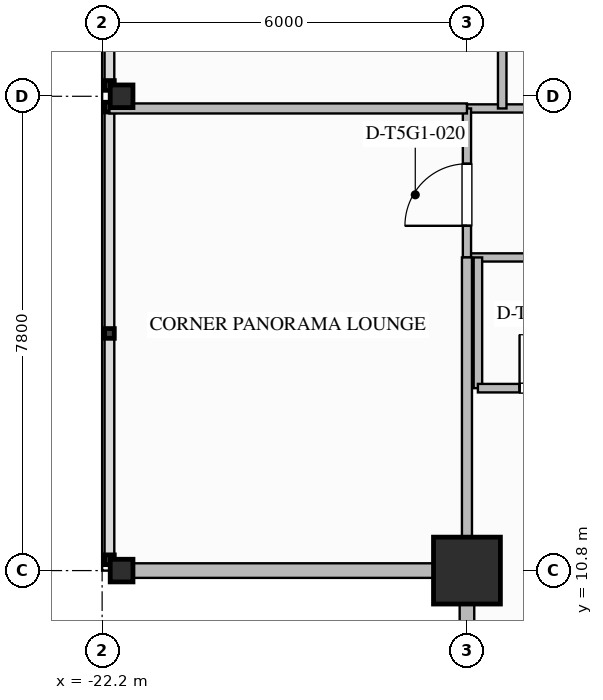
"""IFC4 building model, lengths in metres.
Left out: names, types, materials, properties, quantities, classifications, styles, units other than length and angle.
Written with IfcOpenShell. Run it as: python <this file> out.ifc"""

import sys

from ifc_helpers import new_model, si_unit, direction, frame, frame_2d, origin, origin_2d, place, context, subcontext, project, spatial, rectangle, i_section, extrude, element, fill, save


model = new_model("IFC4")
c1 = context("Model", 3, precision=1e-05, world=origin(), true_north=direction((0.0, 1.0)))
c2 = subcontext(c1, "Body", "Model", "MODEL_VIEW")
j1 = project(units=[si_unit("LENGTHUNIT", "METRE"), si_unit("PLANEANGLEUNIT", "RADIAN")], contexts=[c1])
p1 = place(None, origin())
s1 = spatial("IfcSite", under=j1, at=p1, CompositionType="ELEMENT")
p2 = place(p1, origin())
s2 = spatial("IfcBuilding", under=s1, at=p2, CompositionType="ELEMENT")
p3 = place(p2, frame((0.0, 0.0, 265.0)))
s3 = spatial("IfcBuildingStorey", under=s2, at=p3, CompositionType="ELEMENT", Elevation=265.0)
p4 = place(p3, frame((-16.2, 10.8, 0.0), z_axis=(0.0, 0.0, 1.0), x_axis=(1.0, 0.0, 0.0)))
e1 = element("IfcColumn", 1, at=p4, inside=s3, PredefinedType="COLUMN", context=c2, shape_type="SweptSolid", body=[
    extrude(rectangle(XDim=1.1, YDim=1.1, at=origin_2d()), origin(), (0.0, 0.0, 1.0), 3.65),
])
for number, where, z_axis, x_axis in (
    (2, (-21.88, 10.8, 0.0), (0.0, 0.0, 1.0), (1.0, 0.0, 0.0)),
    (3, (-21.88, 18.6, 0.0), (0.0, 0.0, 1.0), (1.0, 0.0, 0.0)),
):
    element("IfcColumn", number, at=place(p3, frame(where, z_axis=z_axis, x_axis=x_axis)), inside=s3, PredefinedType="COLUMN", context=c2, shape_type="SweptSolid", body=[
        extrude(i_section(OverallWidth=0.374, OverallDepth=0.372, WebThickness=0.016, FlangeThickness=0.026, FilletRadius=0.025, at=origin_2d()), origin(), (0.0, 0.0, 1.0), 3.647),
    ])
for number, where, z_axis, x_axis in (
    (4, (-16.2, 4.92, 0.0), (0.0, 0.0, 1.0), (0.0, 1.0, 0.0)),
    (5, (-16.2, 10.8, 0.0), (0.0, 0.0, 1.0), (-1.0, 0.0, 0.0)),
):
    element("IfcWall", number, at=place(p3, frame(where, z_axis=z_axis, x_axis=x_axis)), inside=s3, PredefinedType="STANDARD", context=c2, shape_type="SweptSolid", body=[
        extrude(rectangle(XDim=5.88, YDim=0.24, at=frame_2d((2.94, 0.0))), origin(), (0.0, 0.0, 1.0), 2.779),
    ])
p5 = place(p3, frame((-16.2, 15.95, 0.0), z_axis=(0.0, 0.0, 1.0), x_axis=(1.0, 0.0, 0.0)))
e6 = element("IfcWall", 6, at=p5, inside=s3, PredefinedType="PARTITIONING", context=c2, shape_type="SweptSolid", body=[
    extrude(rectangle(XDim=38.28, YDim=0.135, at=frame_2d((19.14, 0.0))), origin(), (0.0, 0.0, 1.0), 3.39),
])
p6 = place(p5, frame((35.785, 0.0, 0.0)))
e7 = element("IfcOpeningElement", 7, at=p6, cuts=e6, PredefinedType="OPENING", context=c2, shape_type="SweptSolid", body=[
    extrude(rectangle(XDim=1.26, YDim=2.2, at=frame_2d((0.63, 1.1))), frame((0.0, 0.077, 0.0), z_axis=(0.0, -1.0, 0.0), x_axis=(1.0, 0.0, 0.0)), (0.0, 0.0, 1.0), 0.155),
])
p7 = place(p5, frame((3.285, 0.0, 0.0)))
e8 = element("IfcOpeningElement", 8, at=p7, cuts=e6, PredefinedType="OPENING", context=c2, shape_type="SweptSolid", body=[
    extrude(rectangle(XDim=1.26, YDim=2.2, at=frame_2d((0.63, 1.1))), frame((0.0, 0.077, 0.0), z_axis=(0.0, -1.0, 0.0), x_axis=(1.0, 0.0, 0.0)), (0.0, 0.0, 1.0), 0.155),
])
p8 = place(p5, frame((7.335, 0.0, 0.0)))
e9 = element("IfcOpeningElement", 9, at=p8, cuts=e6, PredefinedType="OPENING", context=c2, shape_type="SweptSolid", body=[
    extrude(rectangle(XDim=1.26, YDim=2.2, at=frame_2d((0.63, 1.1))), frame((0.0, 0.077, 0.0), z_axis=(0.0, -1.0, 0.0), x_axis=(1.0, 0.0, 0.0)), (0.0, 0.0, 1.0), 0.155),
])
p9 = place(p5, frame((15.69, 0.0, 0.0)))
e10 = element("IfcOpeningElement", 10, at=p9, cuts=e6, PredefinedType="OPENING", context=c2, shape_type="SweptSolid", body=[
    extrude(rectangle(XDim=1.02, YDim=2.15, at=frame_2d((0.51, 1.075))), frame((0.0, 0.077, 0.0), z_axis=(0.0, -1.0, 0.0), x_axis=(1.0, 0.0, 0.0)), (0.0, 0.0, 1.0), 0.155),
])
p10 = place(p5, frame((21.375, 0.0, 0.0)))
e11 = element("IfcOpeningElement", 11, at=p10, cuts=e6, PredefinedType="OPENING", context=c2, shape_type="SweptSolid", body=[
    extrude(rectangle(XDim=1.26, YDim=2.2, at=frame_2d((0.63, 1.1))), frame((0.0, 0.077, 0.0), z_axis=(0.0, -1.0, 0.0), x_axis=(1.0, 0.0, 0.0)), (0.0, 0.0, 1.0), 0.155),
])
p11 = place(p5, frame((30.285, 0.0, 0.0)))
e12 = element("IfcOpeningElement", 12, at=p11, cuts=e6, PredefinedType="OPENING", context=c2, shape_type="SweptSolid", body=[
    extrude(rectangle(XDim=1.26, YDim=2.2, at=frame_2d((0.63, 1.1))), frame((0.0, 0.077, 0.0), z_axis=(0.0, -1.0, 0.0), x_axis=(1.0, 0.0, 0.0)), (0.0, 0.0, 1.0), 0.155),
])
p12 = place(p3, frame((-16.2, 18.4, 0.0), z_axis=(0.0, 0.0, 1.0), x_axis=(1.0, 0.0, 0.0)))
e13 = element("IfcWall", 13, at=p12, inside=s3, PredefinedType="PARTITIONING", context=c2, shape_type="SweptSolid", body=[
    extrude(rectangle(XDim=7.6, YDim=0.135, at=frame_2d((3.8, 0.0))), origin(), (0.0, 0.0, 1.0), 2.767),
])
p13 = place(p12, frame((4.585, 0.0, 0.0)))
e14 = element("IfcOpeningElement", 14, at=p13, cuts=e13, PredefinedType="OPENING", context=c2, shape_type="SweptSolid", body=[
    extrude(rectangle(XDim=1.26, YDim=2.2, at=frame_2d((0.63, 1.1))), frame((0.0, 0.077, 0.0), z_axis=(0.0, -1.0, 0.0), x_axis=(1.0, 0.0, 0.0)), (0.0, 0.0, 1.0), 0.155),
])
p14 = place(p3, frame((-16.2, 15.95, 0.0), z_axis=(0.0, 0.0, 1.0), x_axis=(0.0, 1.0, 0.0)))
e15 = element("IfcWall", 15, at=p14, inside=s3, PredefinedType="PARTITIONING", context=c2, shape_type="SweptSolid", body=[
    extrude(rectangle(XDim=2.45, YDim=0.135, at=frame_2d((1.225, 0.0))), origin(), (0.0, 0.0, 1.0), 2.764),
])
p15 = place(p14, frame((0.52, 0.0, 0.0)))
e16 = element("IfcOpeningElement", 16, at=p15, cuts=e15, PredefinedType="OPENING", context=c2, shape_type="SweptSolid", body=[
    extrude(rectangle(XDim=1.02, YDim=2.15, at=frame_2d((0.51, 1.075))), frame((0.0, 0.077, 0.0), z_axis=(0.0, -1.0, 0.0), x_axis=(1.0, 0.0, 0.0)), (0.0, 0.0, 1.0), 0.155),
])
p16 = place(p3, frame((-16.2, 10.92, 0.0), z_axis=(0.0, 0.0, 1.0), x_axis=(0.0, 1.0, 0.0)))
e17 = element("IfcWall", 17, at=p16, inside=s3, PredefinedType="PARTITIONING", context=c2, shape_type="SweptSolid", body=[
    extrude(rectangle(XDim=5.03, YDim=0.165, at=frame_2d((2.515, 0.0))), origin(), (0.0, 0.0, 1.0), 2.764),
])
p17 = place(p3, frame((-22.08, 18.4, 0.0), z_axis=(0.0, 0.0, 1.0), x_axis=(1.0, 0.0, 0.0)))
e18 = element("IfcWall", 18, at=p17, inside=s3, PredefinedType="PARTITIONING", context=c2, shape_type="SweptSolid", body=[
    extrude(rectangle(XDim=5.88, YDim=0.165, at=frame_2d((2.94, 0.0))), origin(), (0.0, 0.0, 1.0), 2.764),
])
p18 = place(p3, frame((-16.02, 15.95, 0.0), z_axis=(0.0, 0.0, 1.0), x_axis=(0.0, -1.0, 0.0)))
e19 = element("IfcWall", 19, at=p18, inside=s3, PredefinedType="PLUMBINGWALL", context=c2, shape_type="SweptSolid", body=[
    extrude(rectangle(XDim=2.15, YDim=0.14, at=frame_2d((1.075, 0.0))), origin(), (0.0, 0.0, 1.0), 2.764),
])
p19 = place(p3, frame((-16.02, 13.8, 0.0), z_axis=(0.0, 0.0, 1.0), x_axis=(1.0, 0.0, 0.0)))
e20 = element("IfcWall", 20, at=p19, inside=s3, PredefinedType="PLUMBINGWALL", context=c2, shape_type="SweptSolid", body=[
    extrude(rectangle(XDim=2.25, YDim=0.14, at=frame_2d((1.125, 0.0))), origin(), (0.0, 0.0, 1.0), 3.39),
])
p20 = place(p19, frame((0.685, 0.0, 0.0)))
e21 = element("IfcOpeningElement", 21, at=p20, cuts=e20, PredefinedType="OPENING", context=c2, shape_type="SweptSolid", body=[
    extrude(rectangle(XDim=0.88, YDim=2.1, at=frame_2d((0.44, 1.05))), frame((0.0, 0.08, 0.0), z_axis=(0.0, -1.0, 0.0), x_axis=(1.0, 0.0, 0.0)), (0.0, 0.0, 1.0), 0.16),
])
p21 = place(p3, frame((-15.62, 18.4, 0.0), z_axis=(0.0, 0.0, 1.0), x_axis=(0.0, 1.0, 0.0)))
e22 = element("IfcWall", 22, at=p21, inside=s3, PredefinedType="PLUMBINGWALL", context=c2, shape_type="SweptSolid", body=[
    extrude(rectangle(XDim=2.15, YDim=0.14, at=frame_2d((1.075, 0.0))), origin(), (0.0, 0.0, 1.0), 3.39),
])
p22 = place(p15, origin())
e23 = element("IfcDoor", 23, at=p22, inside=s3, OperationType="SINGLE_SWING_LEFT", PredefinedType="DOOR", context=c2, shape_type="SweptSolid", body=[
    extrude(rectangle(XDim=1.02, YDim=2.15, at=frame_2d((0.51, 1.075))), frame((0.0, 0.025, 0.0), z_axis=(0.0, -1.0, 0.0), x_axis=(1.0, 0.0, 0.0)), (0.0, 0.0, 1.0), 0.05),
])
fill(e16, e23)
p23 = place(p20, origin())
e24 = element("IfcDoor", 24, at=p23, inside=s3, OperationType="SINGLE_SWING_LEFT", PredefinedType="DOOR", context=c2, shape_type="SweptSolid", body=[
    extrude(rectangle(XDim=0.88, YDim=2.1, at=frame_2d((0.44, 1.05))), frame((0.0, 0.025, 0.0), z_axis=(0.0, -1.0, 0.0), x_axis=(1.0, 0.0, 0.0)), (0.0, 0.0, 1.0), 0.05),
])
fill(e21, e24)
save(model, sys.argv[1])
